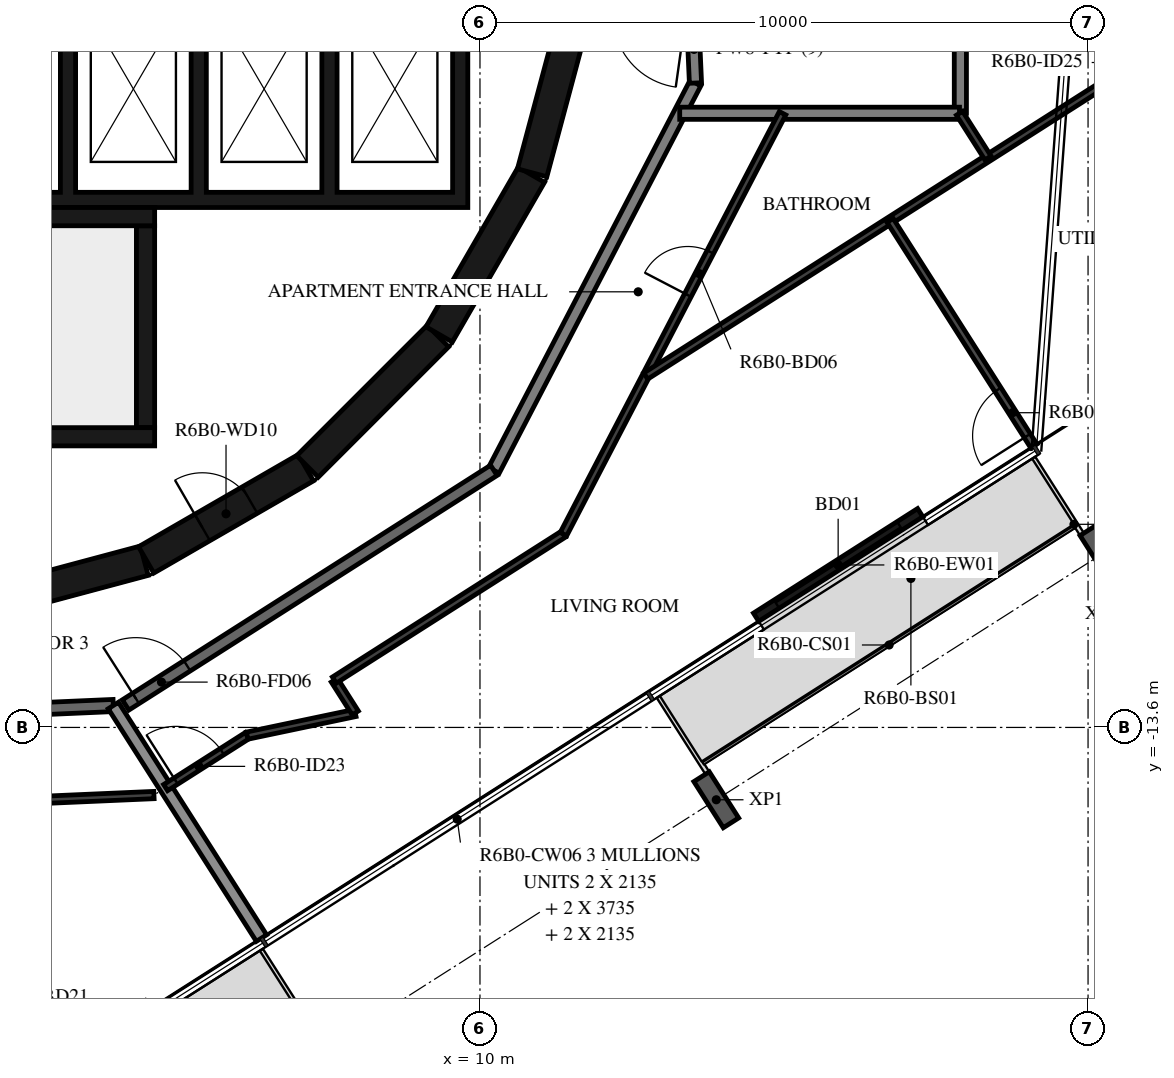
"""IFC4 building model, lengths in metres.
Left out: names, types, materials, properties, quantities, classifications, styles, units other than length and angle.
Written with IfcOpenShell. Run it as: python <this file> out.ifc"""

import sys

from ifc_helpers import new_model, si_unit, direction, frame, frame_2d, origin, origin_2d, place, context, subcontext, project, spatial, polyline, rectangle, i_section, outline, extrude, element, fill, save


model = new_model("IFC4")
c1 = context("Model", 3, precision=1e-05, world=origin(), true_north=direction((0.0, 1.0)))
c2 = subcontext(c1, "Body", "Model", "MODEL_VIEW")
j1 = project(units=[si_unit("LENGTHUNIT", "METRE"), si_unit("PLANEANGLEUNIT", "RADIAN")], contexts=[c1])
p1 = place(None, origin())
s1 = spatial("IfcSite", under=j1, at=p1, CompositionType="ELEMENT")
p2 = place(p1, origin())
s2 = spatial("IfcBuilding", under=s1, at=p2, CompositionType="ELEMENT")
p3 = place(p2, frame((0.0, 0.0, 240.7)))
s3 = spatial("IfcBuildingStorey", under=s2, at=p3, CompositionType="ELEMENT", Elevation=240.7)
for number, where, z_axis, x_axis in (
    (1, (13.886, -14.79, -0.38), (0.0, 0.0, 1.0), (-0.843, -0.537, 0.0)),
    (2, (20.237, -10.744, -0.38), (0.0, 0.0, 1.0), (-0.843, -0.537, 0.0)),
):
    element("IfcColumn", number, at=place(p3, frame(where, z_axis=z_axis, x_axis=x_axis)), inside=s3, PredefinedType="COLUMN", context=c2, shape_type="SweptSolid", body=[
        extrude(i_section(OverallWidth=0.3, OverallDepth=0.9, WebThickness=0.019, FlangeThickness=0.035, FilletRadius=0.03, at=origin_2d()), origin(), (0.0, 0.0, 1.0), 3.5),
    ])
p4 = place(p3, frame((14.541, -11.788, 0.0), z_axis=(0.0, 0.0, 1.0), x_axis=(0.843419508298, 0.53725555653, 0.0)))
e3 = element("IfcWall", 3, at=p4, inside=s3, PredefinedType="STANDARD", context=c2, shape_type="SweptSolid", body=[
    extrude(rectangle(XDim=3.2, YDim=0.16, at=frame_2d((1.6, 0.0))), origin(), (0.0, 0.0, 1.0), 3.12),
])
p5 = place(p4, frame((0.4, 0.0, 0.0)))
e4 = element("IfcOpeningElement", 4, at=p5, cuts=e3, PredefinedType="OPENING", context=c2, shape_type="SweptSolid", body=[
    extrude(rectangle(XDim=2.4, YDim=2.4, at=frame_2d((1.2, 1.2))), frame((0.0, 0.09, 0.0), z_axis=(0.0, -1.0, 0.0), x_axis=(1.0, 0.0, 0.0)), (0.0, 0.0, 1.0), 0.18),
])
p6 = place(p3, frame((1.55, -11.643, 0.0), z_axis=(0.0, 0.0, 1.0), x_axis=(0.965948410781, 0.258734743916, 0.0)))
e5 = element("IfcWall", 5, at=p6, inside=s3, PredefinedType="SHEAR", context=c2, shape_type="SweptSolid", body=[
    extrude(rectangle(XDim=3.033, YDim=0.5, at=frame_2d((1.516, 0.0))), origin(), (0.0, 0.0, 1.0), 3.12),
])
p7 = place(p3, frame((4.51, -10.845, 0.0), z_axis=(0.0, 0.0, 1.0), x_axis=(0.865975092491, 0.500087131594, 0.0)))
e6 = element("IfcWall", 6, at=p7, inside=s3, PredefinedType="SHEAR", context=c2, shape_type="SweptSolid", body=[
    extrude(rectangle(XDim=3.033, YDim=0.5, at=frame_2d((1.516, 0.0))), origin(), (0.0, 0.0, 1.0), 3.12),
])
p8 = place(p7, frame((1.066, 0.0, 0.0)))
e7 = element("IfcOpeningElement", 7, at=p8, cuts=e6, PredefinedType="OPENING", context=c2, shape_type="SweptSolid", body=[
    extrude(rectangle(XDim=0.9, YDim=2.1, at=frame_2d((0.45, 1.05))), frame((0.0, 0.26, 0.0), z_axis=(0.0, -1.0, 0.0), x_axis=(1.0, 0.0, 0.0)), (0.0, 0.0, 1.0), 0.52),
])
p9 = place(p3, frame((7.164, -9.308, 0.0), z_axis=(0.0, 0.0, 1.0), x_axis=(0.707106781187, 0.707106781187, 0.0)))
e8 = element("IfcWall", 8, at=p9, inside=s3, PredefinedType="SHEAR", context=c2, shape_type="SweptSolid", body=[
    extrude(rectangle(XDim=3.032, YDim=0.5, at=frame_2d((1.516, 0.0))), origin(), (0.0, 0.0, 1.0), 3.12),
])
for number, where, z_axis, x_axis in (
    (9, (9.329, -7.137, 0.0), (0.0, 0.0, 1.0), (0.5, 0.866, 0.0)),
    (10, (10.858, -4.479, 0.0), (0.0, 0.0, 1.0), (0.259, 0.966, 0.0)),
):
    element("IfcWall", number, at=place(p3, frame(where, z_axis=z_axis, x_axis=x_axis)), inside=s3, PredefinedType="SHEAR", context=c2, shape_type="SweptSolid", body=[
        extrude(rectangle(XDim=3.033, YDim=0.5, at=frame_2d((1.516, 0.0))), origin(), (0.0, 0.0, 1.0), 3.12),
    ])
p10 = place(p3, frame((-2.4, -5.2, 0.0), z_axis=(0.0, 0.0, 1.0), x_axis=(1.0, 0.0, 0.0)))
e11 = element("IfcWall", 11, at=p10, inside=s3, PredefinedType="SHEAR", context=c2, shape_type="SweptSolid", body=[
    extrude(rectangle(XDim=7.05, YDim=0.3, at=frame_2d((3.525, 0.0))), origin(), (0.0, 0.0, 1.0), 3.12),
])
p11 = place(p3, frame((4.5, -8.67, 0.0), z_axis=(0.0, 0.0, 1.0), x_axis=(0.0, 1.0, 0.0)))
e12 = element("IfcWall", 12, at=p11, inside=s3, PredefinedType="SHEAR", context=c2, shape_type="SweptSolid", body=[
    extrude(rectangle(XDim=3.32, YDim=0.3, at=frame_2d((1.66, 0.0))), origin(), (0.0, 0.0, 1.0), 3.12),
])
p12 = place(p3, frame((0.1, -8.82, 0.0), z_axis=(0.0, 0.0, 1.0), x_axis=(1.0, 0.0, 0.0)))
e13 = element("IfcWall", 13, at=p12, inside=s3, PredefinedType="SHEAR", context=c2, shape_type="SweptSolid", body=[
    extrude(rectangle(XDim=4.55, YDim=0.3, at=frame_2d((2.275, 0.0))), origin(), (0.0, 0.0, 1.0), 3.12),
])
p13 = place(p3, origin())
e14 = element("IfcWall", 14, at=p13, inside=s3, PredefinedType="SHEAR", context=c2, shape_type="SweptSolid", body=[
    extrude(outline(polyline([(9.8, -5.05), (9.8, -4.8), (9.8, -1.9), (9.55, -1.9), (9.55, -4.8), (7.65, -4.8), (7.65, -1.9), (7.4, -1.9), (7.4, -4.8), (5.5, -4.8), (5.5, -1.9), (5.25, -1.9), (5.25, -4.8), (3.35, -4.8), (3.35, -1.9), (3.1, -1.9), (3.1, -4.8), (1.2, -4.8), (1.2, -1.9), (0.95, -1.9), (0.95, -4.8), (-0.95, -4.8), (-0.95, -1.9), (-1.2, -1.9), (-1.2, -4.8), (-3.1, -4.8), (-3.1, -1.9), (-3.35, -1.9), (-3.35, -4.8), (-5.25, -4.8), (-5.25, -1.9), (-5.5, -1.9), (-5.5, -4.8), (-7.4, -4.8), (-7.4, -1.9), (-7.65, -1.9), (-7.65, -4.8), (-9.55, -4.8), (-9.55, -1.9), (-9.8, -1.9), (-9.8, -4.8), (-9.8, -5.05), (9.8, -5.05)])), origin(), (0.0, 0.0, 1.0), 3.12),
])
p14 = place(p3, frame((10.228, -9.372, 0.0), z_axis=(0.0, 0.0, 1.0), x_axis=(0.461759464021, 0.887005184532, 0.0)))
e15 = element("IfcWall", 15, at=p14, inside=s3, PredefinedType="STANDARD", context=c2, shape_type="SweptSolid", body=[
    extrude(rectangle(XDim=7.181, YDim=0.2, at=frame_2d((3.591, 0.0))), origin(), (0.0, 0.0, 1.0), 3.12),
])
p15 = place(p3, frame((13.544, -3.003, 0.0), z_axis=(0.0, 0.0, 1.0), x_axis=(-0.043666917606, 0.999046145234, 0.0)))
e16 = element("IfcWall", 16, at=p15, inside=s3, PredefinedType="STANDARD", context=c2, shape_type="SweptSolid", body=[
    extrude(rectangle(XDim=1.107, YDim=0.2, at=frame_2d((0.553, 0.0))), origin(), (0.0, 0.0, 1.0), 3.12),
])
p16 = place(p3, frame((-3.003, -13.544, 0.0), z_axis=(0.0, 0.0, 1.0), x_axis=(0.999048221872, 0.043619380718, 0.0)))
e17 = element("IfcWall", 17, at=p16, inside=s3, PredefinedType="STANDARD", context=c2, shape_type="SweptSolid", body=[
    extrude(rectangle(XDim=6.979, YDim=0.2, at=frame_2d((3.49, 0.0))), origin(), (0.0, 0.0, 1.0), 3.12),
])
p17 = place(p16, frame((1.6, 0.0, 0.0)))
e18 = element("IfcOpeningElement", 18, at=p17, cuts=e17, PredefinedType="OPENING", context=c2, shape_type="SweptSolid", body=[
    extrude(rectangle(XDim=1.0, YDim=2.1, at=frame_2d((0.5, 1.05))), frame((0.0, 0.11, 0.0), z_axis=(0.0, -1.0, 0.0), x_axis=(1.0, 0.0, 0.0)), (0.0, 0.0, 1.0), 0.22),
])
p18 = place(p3, frame((4.172, -13.231, 0.0), z_axis=(0.0, 0.0, 1.0), x_axis=(0.843388394728, 0.537304397561, 0.0)))
e19 = element("IfcWall", 19, at=p18, inside=s3, PredefinedType="STANDARD", context=c2, shape_type="SweptSolid", body=[
    extrude(rectangle(XDim=7.181, YDim=0.2, at=frame_2d((3.59, 0.0))), origin(), (0.0, 0.0, 1.0), 3.12),
])
p19 = place(p18, frame((0.2, 0.0, 0.0)))
e20 = element("IfcOpeningElement", 20, at=p19, cuts=e19, PredefinedType="OPENING", context=c2, shape_type="SweptSolid", body=[
    extrude(rectangle(XDim=1.0, YDim=2.1, at=frame_2d((0.5, 1.05))), frame((0.0, 0.11, 0.0), z_axis=(0.0, -1.0, 0.0), x_axis=(1.0, 0.0, 0.0)), (0.0, 0.0, 1.0), 0.22),
])
p20 = place(p3, frame((17.9, -3.5, 0.0), z_axis=(0.0, 0.0, 1.0), x_axis=(0.0, 1.0, 0.0)))
e21 = element("IfcWall", 21, at=p20, inside=s3, PredefinedType="STANDARD", context=c2, shape_type="SweptSolid", body=[
    extrude(rectangle(XDim=7.0, YDim=0.2, at=frame_2d((3.5, 0.0))), origin(), (0.0, 0.0, 1.0), 3.12),
])
p21 = place(p3, frame((13.285, -3.5, 0.0), z_axis=(0.0, 0.0, 1.0), x_axis=(1.0, 0.0, 0.0)))
e22 = element("IfcWall", 22, at=p21, inside=s3, PredefinedType="STANDARD", context=c2, shape_type="SweptSolid", body=[
    extrude(rectangle(XDim=4.601, YDim=0.2, at=frame_2d((2.301, 0.0))), origin(), (0.0, 0.0, 1.0), 3.12),
])
p22 = place(p3, frame((6.407, -17.064, 0.0), z_axis=(0.0, 0.0, 1.0), x_axis=(-0.537324777979, 0.843375410461, 0.0)))
e23 = element("IfcWall", 23, at=p22, inside=s3, PredefinedType="STANDARD", context=c2, shape_type="SweptSolid", body=[
    extrude(rectangle(XDim=4.535, YDim=0.2, at=frame_2d((2.268, 0.0))), origin(), (0.0, 0.0, 1.0), 2.73),
])
p23 = place(p3, frame((-1.852, -14.995, 0.0), z_axis=(0.0, 0.0, 1.0), x_axis=(0.999047773092, 0.043629658249, 0.0)))
e24 = element("IfcWall", 24, at=p23, inside=s3, PredefinedType="PARTITIONING", context=c2, shape_type="SweptSolid", body=[
    extrude(rectangle(XDim=6.497, YDim=0.12, at=frame_2d((3.248, 0.0))), origin(), (0.0, 0.0, 1.0), 3.12),
])
p24 = place(p3, frame((4.83, -14.59, 0.0), z_axis=(0.0, 0.0, 1.0), x_axis=(0.843395898817, 0.537292618467, 0.0)))
e25 = element("IfcWall", 25, at=p24, inside=s3, PredefinedType="PARTITIONING", context=c2, shape_type="SweptSolid", body=[
    extrude(rectangle(XDim=1.59, YDim=0.12, at=frame_2d((0.795, 0.0))), origin(), (0.0, 0.0, 1.0), 3.12),
])
p25 = place(p24, frame((0.2, 0.0, 0.0)))
e26 = element("IfcOpeningElement", 26, at=p25, cuts=e25, PredefinedType="OPENING", context=c2, shape_type="SweptSolid", body=[
    extrude(rectangle(XDim=0.9, YDim=2.1, at=frame_2d((0.45, 1.05))), frame((0.0, 0.07, 0.0), z_axis=(0.0, -1.0, 0.0), x_axis=(1.0, 0.0, 0.0)), (0.0, 0.0, 1.0), 0.14),
])
p26 = place(p3, frame((6.172, -13.735, 0.0), z_axis=(0.0, 0.0, 1.0), x_axis=(0.978659442958, 0.205488916271, 0.0)))
e27 = element("IfcWall", 27, at=p26, inside=s3, PredefinedType="PARTITIONING", context=c2, shape_type="SweptSolid", body=[
    extrude(rectangle(XDim=1.817, YDim=0.12, at=frame_2d((0.908, 0.0))), origin(), (0.0, 0.0, 1.0), 3.12),
])
p27 = place(p3, frame((7.949, -13.362, 0.0), z_axis=(0.0, 0.0, 1.0), x_axis=(-0.537343932066, 0.843363206852, 0.0)))
e28 = element("IfcWall", 28, at=p27, inside=s3, PredefinedType="PARTITIONING", context=c2, shape_type="SweptSolid", body=[
    extrude(rectangle(XDim=0.641, YDim=0.12, at=frame_2d((0.32, 0.0))), origin(), (0.0, 0.0, 1.0), 3.12),
])
p28 = place(p3, frame((7.605, -12.822, 0.0), z_axis=(0.0, 0.0, 1.0), x_axis=(0.843413865585, 0.537264414733, 0.0)))
e29 = element("IfcWall", 29, at=p28, inside=s3, PredefinedType="PARTITIONING", context=c2, shape_type="SweptSolid", body=[
    extrude(rectangle(XDim=4.467, YDim=0.12, at=frame_2d((2.234, 0.0))), origin(), (0.0, 0.0, 1.0), 3.12),
])
p29 = place(p3, frame((11.373, -10.421, 0.0), z_axis=(0.0, 0.0, 1.0), x_axis=(0.461746745223, 0.887011805601, 0.0)))
e30 = element("IfcWall", 30, at=p29, inside=s3, PredefinedType="PARTITIONING", context=c2, shape_type="SweptSolid", body=[
    extrude(rectangle(XDim=7.803, YDim=0.12, at=frame_2d((3.901, 0.0))), origin(), (0.0, 0.0, 1.0), 3.12),
])
p30 = place(p29, frame((4.431, 0.0, 0.0)))
e31 = element("IfcOpeningElement", 31, at=p30, cuts=e30, PredefinedType="OPENING", context=c2, shape_type="SweptSolid", body=[
    extrude(rectangle(XDim=0.8, YDim=2.1, at=frame_2d((0.4, 1.05))), frame((0.0, 0.07, 0.0), z_axis=(0.0, -1.0, 0.0), x_axis=(1.0, 0.0, 0.0)), (0.0, 0.0, 1.0), 0.14),
])
p31 = place(p3, frame((21.368, -2.316, 0.0), z_axis=(0.0, 0.0, 1.0), x_axis=(-0.843388627156, -0.537304032726, 0.0)))
e32 = element("IfcWall", 32, at=p31, inside=s3, PredefinedType="PARTITIONING", context=c2, shape_type="SweptSolid", body=[
    extrude(rectangle(XDim=10.246, YDim=0.12, at=frame_2d((5.123, 0.0))), origin(), (0.0, 0.0, 1.0), 3.12),
])
p32 = place(p31, frame((0.2, 0.0, 0.0)))
e33 = element("IfcOpeningElement", 33, at=p32, cuts=e32, PredefinedType="OPENING", context=c2, shape_type="SweptSolid", body=[
    extrude(rectangle(XDim=0.9, YDim=2.1, at=frame_2d((0.45, 1.05))), frame((0.0, 0.07, 0.0), z_axis=(0.0, -1.0, 0.0), x_axis=(1.0, 0.0, 0.0)), (0.0, 0.0, 1.0), 0.14),
])
p33 = place(p3, frame((19.109, -8.972, 0.0), z_axis=(0.0, 0.0, 1.0), x_axis=(-0.537345751125, 0.843362047847, 0.0)))
e34 = element("IfcWall", 34, at=p33, inside=s3, PredefinedType="PARTITIONING", context=c2, shape_type="SweptSolid", body=[
    extrude(rectangle(XDim=4.4, YDim=0.12, at=frame_2d((2.2, 0.0))), origin(), (0.0, 0.0, 1.0), 2.73),
])
p34 = place(p33, frame((0.2, 0.0, 0.0)))
e35 = element("IfcOpeningElement", 35, at=p34, cuts=e34, PredefinedType="OPENING", context=c2, shape_type="SweptSolid", body=[
    extrude(rectangle(XDim=0.9, YDim=2.1, at=frame_2d((0.45, 1.05))), frame((0.0, 0.07, 0.0), z_axis=(0.0, -1.0, 0.0), x_axis=(1.0, 0.0, 0.0)), (0.0, 0.0, 1.0), 0.14),
])
p35 = place(p3, frame((18.355, -4.236, 0.0), z_axis=(0.0, 0.0, 1.0), x_axis=(-0.537400605047, 0.843327095316, 0.0)))
e36 = element("IfcWall", 36, at=p35, inside=s3, PredefinedType="PARTITIONING", context=c2, shape_type="SweptSolid", body=[
    extrude(rectangle(XDim=0.872, YDim=0.12, at=frame_2d((0.436, 0.0))), origin(), (0.0, 0.0, 1.0), 3.12),
])
p36 = place(p5, origin())
e37 = element("IfcDoor", 37, at=p36, inside=s3, OperationType="DOUBLE_DOOR_SLIDING", PredefinedType="DOOR", context=c2, shape_type="SweptSolid", body=[
    extrude(rectangle(XDim=2.4, YDim=2.4, at=frame_2d((1.2, 1.2))), frame((0.0, 0.025, 0.0), z_axis=(0.0, -1.0, 0.0), x_axis=(1.0, 0.0, 0.0)), (0.0, 0.0, 1.0), 0.05),
])
fill(e4, e37)
p37 = place(p8, origin())
e38 = element("IfcDoor", 38, at=p37, inside=s3, OperationType="SINGLE_SWING_RIGHT", PredefinedType="DOOR", context=c2, shape_type="SweptSolid", body=[
    extrude(rectangle(XDim=0.9, YDim=2.1, at=frame_2d((0.45, 1.05))), frame((0.0, 0.025, 0.0), z_axis=(0.0, -1.0, 0.0), x_axis=(1.0, 0.0, 0.0)), (0.0, 0.0, 1.0), 0.05),
])
fill(e7, e38)
p38 = place(p19, origin())
e39 = element("IfcDoor", 39, at=p38, inside=s3, OperationType="SINGLE_SWING_LEFT", PredefinedType="DOOR", context=c2, shape_type="SweptSolid", body=[
    extrude(rectangle(XDim=1.0, YDim=2.1, at=frame_2d((0.5, 1.05))), frame((0.0, 0.025, 0.0), z_axis=(0.0, -1.0, 0.0), x_axis=(1.0, 0.0, 0.0)), (0.0, 0.0, 1.0), 0.05),
])
fill(e20, e39)
p39 = place(p25, origin())
e40 = element("IfcDoor", 40, at=p39, inside=s3, OperationType="SINGLE_SWING_LEFT", PredefinedType="DOOR", context=c2, shape_type="SweptSolid", body=[
    extrude(rectangle(XDim=0.9, YDim=2.1, at=frame_2d((0.45, 1.05))), frame((0.0, 0.025, 0.0), z_axis=(0.0, -1.0, 0.0), x_axis=(1.0, 0.0, 0.0)), (0.0, 0.0, 1.0), 0.05),
])
fill(e26, e40)
p40 = place(p30, origin())
e41 = element("IfcDoor", 41, at=p40, inside=s3, OperationType="SINGLE_SWING_RIGHT", PredefinedType="DOOR", context=c2, shape_type="SweptSolid", body=[
    extrude(rectangle(XDim=0.8, YDim=2.1, at=frame_2d((0.4, 1.05))), frame((0.0, 0.025, 0.0), z_axis=(0.0, -1.0, 0.0), x_axis=(1.0, 0.0, 0.0)), (0.0, 0.0, 1.0), 0.05),
])
fill(e31, e41)
p41 = place(p34, origin())
e42 = element("IfcDoor", 42, at=p41, inside=s3, OperationType="SINGLE_SWING_RIGHT", PredefinedType="DOOR", context=c2, shape_type="SweptSolid", body=[
    extrude(rectangle(XDim=0.9, YDim=2.1, at=frame_2d((0.45, 1.05))), frame((0.0, 0.025, 0.0), z_axis=(0.0, -1.0, 0.0), x_axis=(1.0, 0.0, 0.0)), (0.0, 0.0, 1.0), 0.05),
])
fill(e35, e42)
save(model, sys.argv[1])
